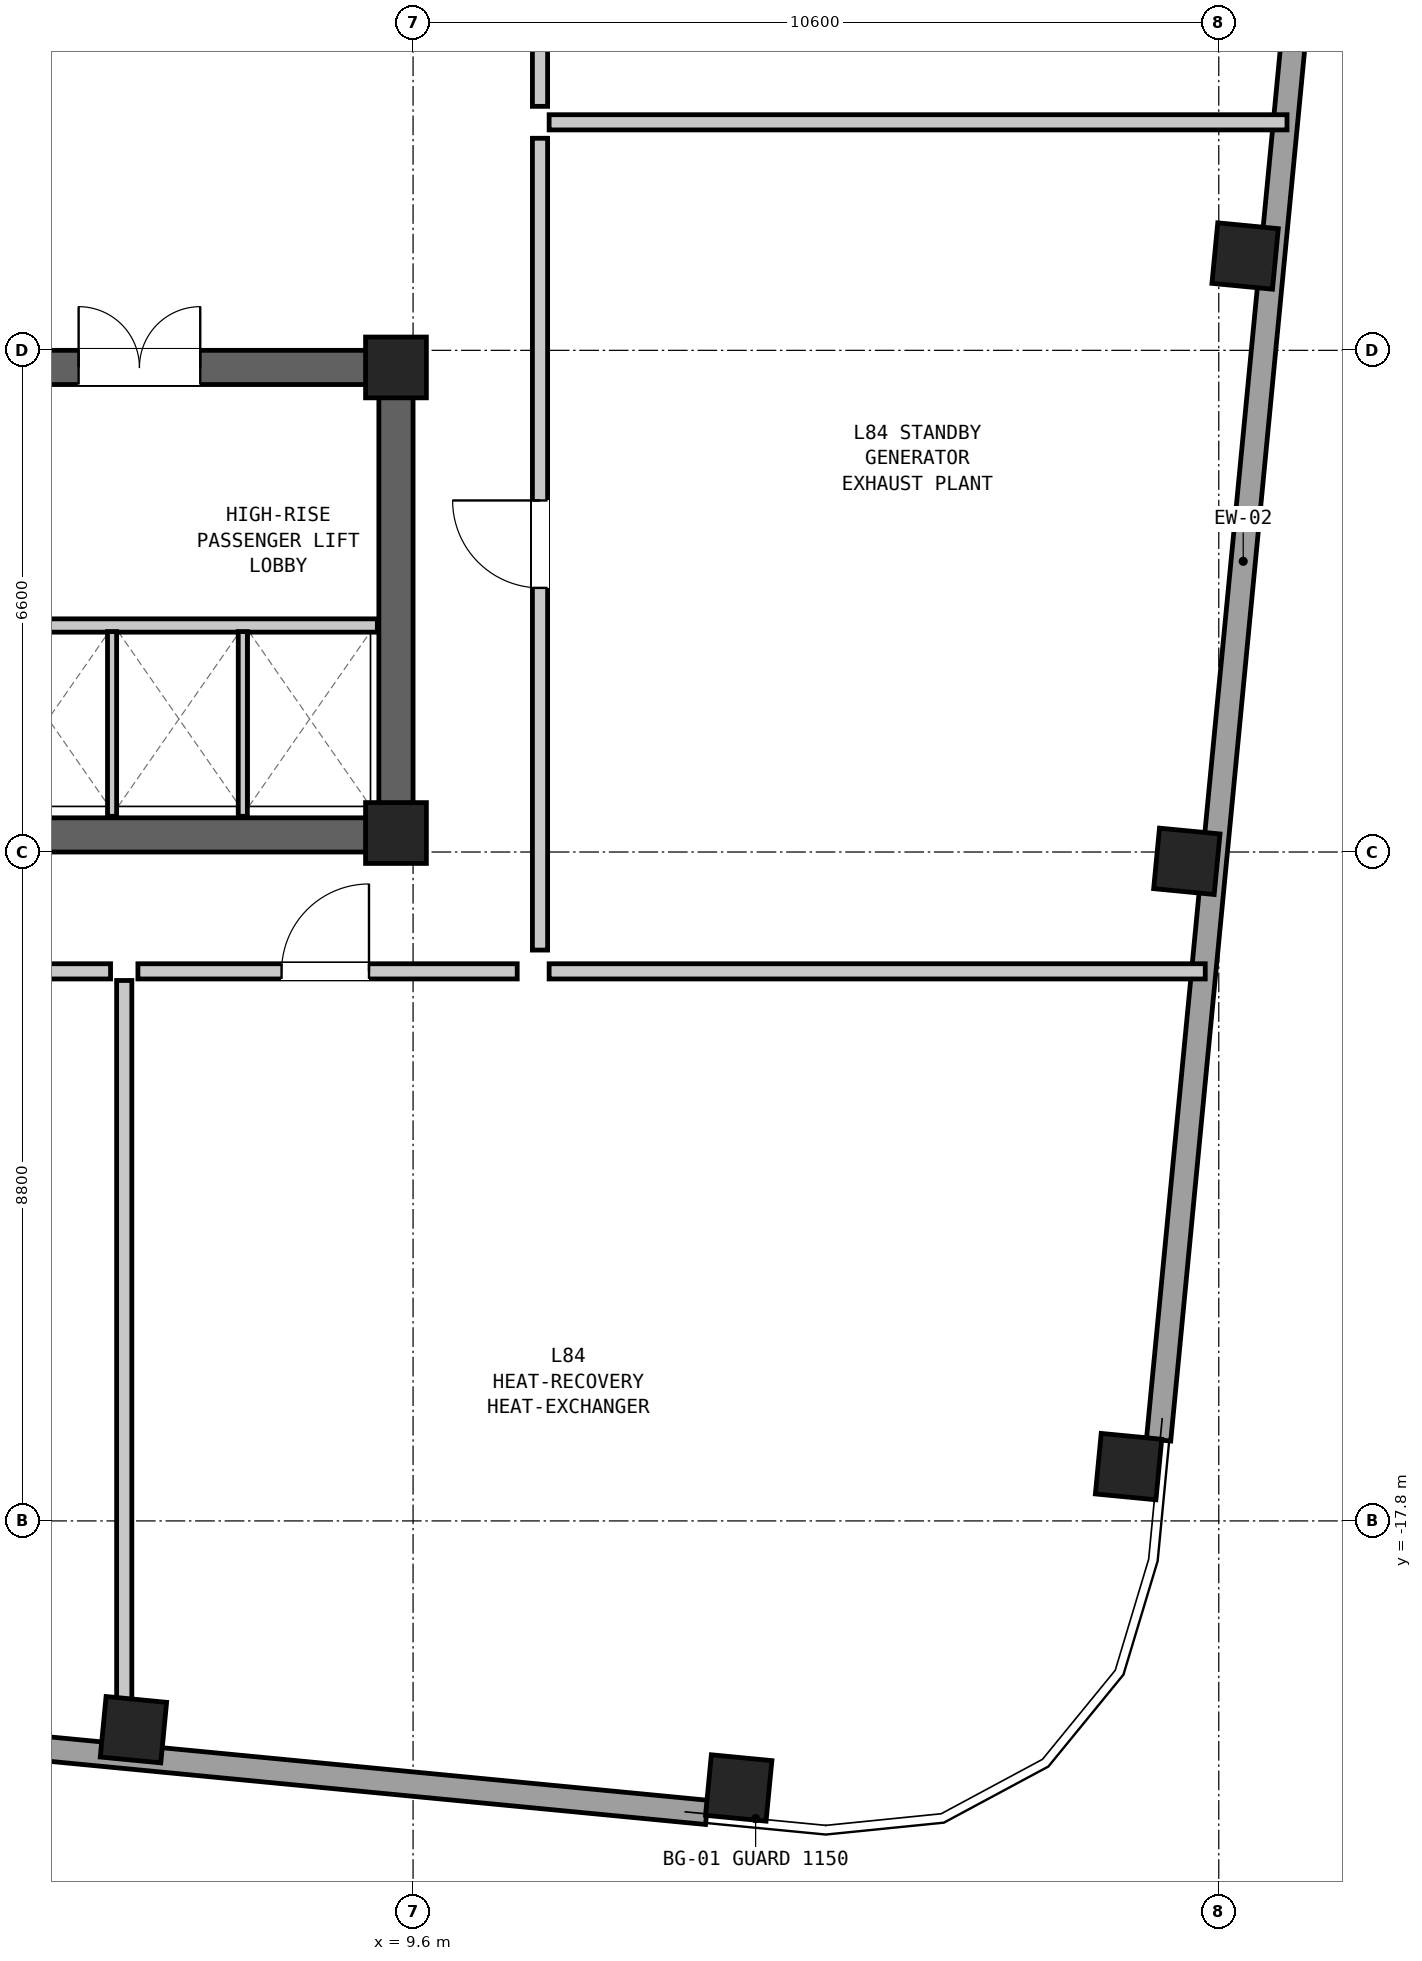
"""IFC4 building model, lengths in metres.
Left out: names, types, materials, properties, quantities, classifications, styles, units other than length and angle.
Written with IfcOpenShell. Run it as: python <this file> out.ifc"""

import sys

from ifc_helpers import new_model, si_unit, direction, frame, frame_2d, origin, origin_2d, place, context, subcontext, project, spatial, rectangle, extrude, element, fill, save


model = new_model("IFC4")
c1 = context("Model", 3, precision=1e-05, world=origin(), true_north=direction((0.0, 1.0)))
c2 = subcontext(c1, "Body", "Model", "MODEL_VIEW")
j1 = project(units=[si_unit("LENGTHUNIT", "METRE"), si_unit("PLANEANGLEUNIT", "RADIAN")], contexts=[c1])
p1 = place(None, origin())
s1 = spatial("IfcSite", under=j1, at=p1, CompositionType="ELEMENT")
p2 = place(p1, origin())
s2 = spatial("IfcBuilding", under=s1, at=p2, CompositionType="ELEMENT")
p3 = place(p2, frame((0.0, 0.0, 284.9)))
s3 = spatial("IfcBuildingStorey", under=s2, at=p3, CompositionType="ELEMENT", Elevation=284.9)
p4 = place(p3, frame((-9.6, -8.775, 0.0), z_axis=(0.0, 0.0, 1.0), x_axis=(1.0, 0.0, 0.0)))
e1 = element("IfcWall", 1, at=p4, inside=s3, PredefinedType="SHEAR", context=c2, shape_type="SweptSolid", body=[
    extrude(rectangle(XDim=19.2, YDim=0.45, at=frame_2d((9.6, 0.0))), origin(), (0.0, 0.0, 1.0), 4.35),
])
p5 = place(p3, frame((-9.6, -2.625, 0.0), z_axis=(0.0, 0.0, 1.0), x_axis=(1.0, 0.0, 0.0)))
e2 = element("IfcWall", 2, at=p5, inside=s3, PredefinedType="SHEAR", context=c2, shape_type="SweptSolid", body=[
    extrude(rectangle(XDim=19.2, YDim=0.45, at=frame_2d((9.6, 0.0))), origin(), (0.0, 0.0, 1.0), 4.35),
])
p6 = place(p5, frame((3.8, 0.0, 0.0)))
e3 = element("IfcOpeningElement", 3, at=p6, cuts=e2, PredefinedType="OPENING", context=c2, shape_type="SweptSolid", body=[
    extrude(rectangle(XDim=1.1, YDim=2.08, at=frame_2d((0.55, 1.04))), frame((0.0, 0.237, 0.0), z_axis=(0.0, -1.0, 0.0), x_axis=(1.0, 0.0, 0.0)), (0.0, 0.0, 1.0), 0.474),
])
p7 = place(p5, frame((10.15, 0.0, 0.0)))
e4 = element("IfcOpeningElement", 4, at=p7, cuts=e2, PredefinedType="OPENING", context=c2, shape_type="SweptSolid", body=[
    extrude(rectangle(XDim=0.9, YDim=2.05, at=frame_2d((0.45, 1.025))), frame((0.0, 0.237, 0.0), z_axis=(0.0, -1.0, 0.0), x_axis=(1.0, 0.0, 0.0)), (0.0, 0.0, 1.0), 0.474),
])
p8 = place(p5, frame((12.1, 0.0, 0.0)))
e5 = element("IfcOpeningElement", 5, at=p8, cuts=e2, PredefinedType="OPENING", context=c2, shape_type="SweptSolid", body=[
    extrude(rectangle(XDim=0.95, YDim=2.1, at=frame_2d((0.475, 1.05))), frame((0.0, 0.237, 0.0), z_axis=(0.0, -1.0, 0.0), x_axis=(1.0, 0.0, 0.0)), (0.0, 0.0, 1.0), 0.474),
])
p9 = place(p5, frame((14.8, 0.0, 0.0)))
e6 = element("IfcOpeningElement", 6, at=p9, cuts=e2, PredefinedType="OPENING", context=c2, shape_type="SweptSolid", body=[
    extrude(rectangle(XDim=1.6, YDim=2.12, at=frame_2d((0.8, 1.06))), frame((0.0, 0.237, 0.0), z_axis=(0.0, -1.0, 0.0), x_axis=(1.0, 0.0, 0.0)), (0.0, 0.0, 1.0), 0.474),
])
p10 = place(p3, frame((9.375, -9.0, 0.0), z_axis=(0.0, 0.0, 1.0), x_axis=(0.0, 1.0, 0.0)))
e7 = element("IfcWall", 7, at=p10, inside=s3, PredefinedType="SHEAR", context=c2, shape_type="SweptSolid", body=[
    extrude(rectangle(XDim=6.6, YDim=0.45, at=frame_2d((3.3, 0.0))), origin(), (0.0, 0.0, 1.0), 4.35),
])
for number, where, z_axis, x_axis in (
    (8, (5.921, -20.546, 0.0), (0.0, 0.0, 1.0), (0.995, -0.096, 0.0)),
    (9, (13.884, -21.313, 0.0), (0.0, 0.0, 1.0), (0.995, -0.096, 0.0)),
    (10, (19.013, -17.085, 0.0), (0.0, 0.0, 1.0), (0.096, 0.995, 0.0)),
    (11, (19.78, -9.122, 0.0), (0.0, 0.0, 1.0), (0.096, 0.995, 0.0)),
    (12, (20.546, -1.159, 0.0), (0.0, 0.0, 1.0), (0.096, 0.995, 0.0)),
    (13, (9.375, -2.625, 0.0), (0.0, 0.0, 1.0), (1.0, 0.0, 0.0)),
    (14, (9.375, -8.75, 0.0), (0.0, 0.0, 1.0), (1.0, 0.0, 0.0)),
):
    element("IfcColumn", number, at=place(p3, frame(where, z_axis=z_axis, x_axis=x_axis)), inside=s3, PredefinedType="COLUMN", context=c2, shape_type="SweptSolid", body=[
        extrude(rectangle(XDim=0.8, YDim=0.8, at=origin_2d()), origin(), (0.0, 0.0, 1.0), 4.35),
    ])
p11 = place(p3, frame((13.463, -21.635, 0.0), z_axis=(0.0, 0.0, 1.0), x_axis=(-0.995395614039, 0.095851820809, 0.0)))
e15 = element("IfcWall", 15, at=p11, inside=s3, PredefinedType="SOLIDWALL", context=c2, shape_type="SweptSolid", body=[
    extrude(rectangle(XDim=23.224, YDim=0.32, at=frame_2d((11.612, 0.0))), origin(), (0.0, 0.0, 1.0), 2.25),
])
p12 = place(p3, frame((21.635, 6.383, 0.0), z_axis=(0.0, 0.0, 1.0), x_axis=(-0.095852823811, -0.995395517454, 0.0)))
e16 = element("IfcWall", 16, at=p12, inside=s3, PredefinedType="SOLIDWALL", context=c2, shape_type="SweptSolid", body=[
    extrude(rectangle(XDim=23.224, YDim=0.32, at=frame_2d((11.612, 0.0))), origin(), (0.0, 0.0, 1.0), 2.25),
])
p13 = place(p3, frame((4.0, -6.02, 0.0), z_axis=(0.0, 0.0, 1.0), x_axis=(1.0, 0.0, 0.0)))
e17 = element("IfcWall", 17, at=p13, inside=s3, PredefinedType="PARTITIONING", context=c2, shape_type="SweptSolid", body=[
    extrude(rectangle(XDim=5.13, YDim=0.175, at=frame_2d((2.565, 0.0))), origin(), (0.0, 0.0, 1.0), 4.07),
])
for number, where, z_axis, x_axis in (
    (18, (5.64, -8.53, 0.0), (0.0, 0.0, 1.0), (0.0, 1.0, 0.0)),
    (19, (7.36, -8.53, 0.0), (0.0, 0.0, 1.0), (0.0, 1.0, 0.0)),
):
    element("IfcWall", number, at=place(p3, frame(where, z_axis=z_axis, x_axis=x_axis)), inside=s3, PredefinedType="PARTITIONING", context=c2, shape_type="SweptSolid", body=[
        extrude(rectangle(XDim=2.43, YDim=0.12, at=frame_2d((1.215, 0.0))), origin(), (0.0, 0.0, 1.0), 4.07),
    ])
p14 = place(p3, frame((0.53, -10.57, 0.0), z_axis=(0.0, 0.0, 1.0), x_axis=(1.0, 0.0, 0.0)))
e20 = element("IfcWall", 20, at=p14, inside=s3, PredefinedType="PARTITIONING", context=c2, shape_type="SweptSolid", body=[
    extrude(rectangle(XDim=5.09, YDim=0.2, at=frame_2d((2.545, 0.0))), origin(), (0.0, 0.0, 1.0), 4.07),
])
p15 = place(p14, frame((1.97, 0.0, 0.0)))
e21 = element("IfcOpeningElement", 21, at=p15, cuts=e20, PredefinedType="OPENING", context=c2, shape_type="SweptSolid", body=[
    extrude(rectangle(XDim=1.15, YDim=2.1, at=frame_2d((0.575, 1.05))), frame((0.0, 0.112, 0.0), z_axis=(0.0, -1.0, 0.0), x_axis=(1.0, 0.0, 0.0)), (0.0, 0.0, 1.0), 0.224),
])
p16 = place(p3, frame((5.8, -20.917, 0.0), z_axis=(0.0, 0.0, 1.0), x_axis=(0.0, 1.0, 0.0)))
e22 = element("IfcWall", 22, at=p16, inside=s3, PredefinedType="PARTITIONING", context=c2, shape_type="SweptSolid", body=[
    extrude(rectangle(XDim=10.227, YDim=0.2, at=frame_2d((5.113, 0.0))), origin(), (0.0, 0.0, 1.0), 2.25),
])
p17 = place(p3, frame((5.98, -10.57, 0.0), z_axis=(0.0, 0.0, 1.0), x_axis=(1.0, 0.0, 0.0)))
e23 = element("IfcWall", 23, at=p17, inside=s3, PredefinedType="PARTITIONING", context=c2, shape_type="SweptSolid", body=[
    extrude(rectangle(XDim=4.99, YDim=0.2, at=frame_2d((2.495, 0.0))), origin(), (0.0, 0.0, 1.0), 4.07),
])
p18 = place(p17, frame((1.89, 0.0, 0.0)))
e24 = element("IfcOpeningElement", 24, at=p18, cuts=e23, PredefinedType="OPENING", context=c2, shape_type="SweptSolid", body=[
    extrude(rectangle(XDim=1.15, YDim=2.1, at=frame_2d((0.575, 1.05))), frame((0.0, 0.112, 0.0), z_axis=(0.0, -1.0, 0.0), x_axis=(1.0, 0.0, 0.0)), (0.0, 0.0, 1.0), 0.224),
])
p19 = place(p3, frame((11.39, -10.57, 0.0), z_axis=(0.0, 0.0, 1.0), x_axis=(1.0, 0.0, 0.0)))
e25 = element("IfcWall", 25, at=p19, inside=s3, PredefinedType="PARTITIONING", context=c2, shape_type="SweptSolid", body=[
    extrude(rectangle(XDim=8.632, YDim=0.2, at=frame_2d((4.316, 0.0))), origin(), (0.0, 0.0, 1.0), 4.07),
])
p20 = place(p3, frame((11.39, 0.6, 0.0), z_axis=(0.0, 0.0, 1.0), x_axis=(1.0, 0.0, 0.0)))
e26 = element("IfcWall", 26, at=p20, inside=s3, PredefinedType="PARTITIONING", context=c2, shape_type="SweptSolid", body=[
    extrude(rectangle(XDim=9.708, YDim=0.2, at=frame_2d((4.854, 0.0))), origin(), (0.0, 0.0, 1.0), 2.25),
])
p21 = place(p3, frame((11.27, -10.29, 0.0), z_axis=(0.0, 0.0, 1.0), x_axis=(0.0, 1.0, 0.0)))
e27 = element("IfcWall", 27, at=p21, inside=s3, PredefinedType="PARTITIONING", context=c2, shape_type="SweptSolid", body=[
    extrude(rectangle(XDim=10.68, YDim=0.2, at=frame_2d((5.34, 0.0))), origin(), (0.0, 0.0, 1.0), 4.07),
])
p22 = place(p21, frame((4.765, 0.0, 0.0)))
e28 = element("IfcOpeningElement", 28, at=p22, cuts=e27, PredefinedType="OPENING", context=c2, shape_type="SweptSolid", body=[
    extrude(rectangle(XDim=1.15, YDim=2.1, at=frame_2d((0.575, 1.05))), frame((0.0, 0.112, 0.0), z_axis=(0.0, -1.0, 0.0), x_axis=(1.0, 0.0, 0.0)), (0.0, 0.0, 1.0), 0.224),
])
p23 = place(p3, frame((11.27, 0.81, 0.0), z_axis=(0.0, 0.0, 1.0), x_axis=(0.0, 1.0, 0.0)))
e29 = element("IfcWall", 29, at=p23, inside=s3, PredefinedType="PARTITIONING", context=c2, shape_type="SweptSolid", body=[
    extrude(rectangle(XDim=10.68, YDim=0.2, at=frame_2d((5.34, 0.0))), origin(), (0.0, 0.0, 1.0), 4.07),
])
p24 = place(p23, frame((6.047, 0.0, 0.0)))
e30 = element("IfcOpeningElement", 30, at=p24, cuts=e29, PredefinedType="OPENING", context=c2, shape_type="SweptSolid", body=[
    extrude(rectangle(XDim=1.15, YDim=2.1, at=frame_2d((0.575, 1.05))), frame((0.0, 0.112, 0.0), z_axis=(0.0, -1.0, 0.0), x_axis=(1.0, 0.0, 0.0)), (0.0, 0.0, 1.0), 0.224),
])
p25 = place(p9, origin())
e31 = element("IfcDoor", 31, at=p25, inside=s3, OperationType="DOUBLE_DOOR_SINGLE_SWING", PredefinedType="DOOR", context=c2, shape_type="SweptSolid", body=[
    extrude(rectangle(XDim=1.6, YDim=2.12, at=frame_2d((0.8, 1.06))), frame((0.0, 0.025, 0.0), z_axis=(0.0, -1.0, 0.0), x_axis=(1.0, 0.0, 0.0)), (0.0, 0.0, 1.0), 0.05),
])
fill(e6, e31)
p26 = place(p18, origin())
e32 = element("IfcDoor", 32, at=p26, inside=s3, OperationType="SINGLE_SWING_RIGHT", PredefinedType="DOOR", context=c2, shape_type="SweptSolid", body=[
    extrude(rectangle(XDim=1.15, YDim=2.1, at=frame_2d((0.575, 1.05))), frame((0.0, 0.025, 0.0), z_axis=(0.0, -1.0, 0.0), x_axis=(1.0, 0.0, 0.0)), (0.0, 0.0, 1.0), 0.05),
])
fill(e24, e32)
p27 = place(p22, origin())
e33 = element("IfcDoor", 33, at=p27, inside=s3, OperationType="SINGLE_SWING_RIGHT", PredefinedType="DOOR", context=c2, shape_type="SweptSolid", body=[
    extrude(rectangle(XDim=1.15, YDim=2.1, at=frame_2d((0.575, 1.05))), frame((0.0, 0.025, 0.0), z_axis=(0.0, -1.0, 0.0), x_axis=(1.0, 0.0, 0.0)), (0.0, 0.0, 1.0), 0.05),
])
fill(e28, e33)
save(model, sys.argv[1])
